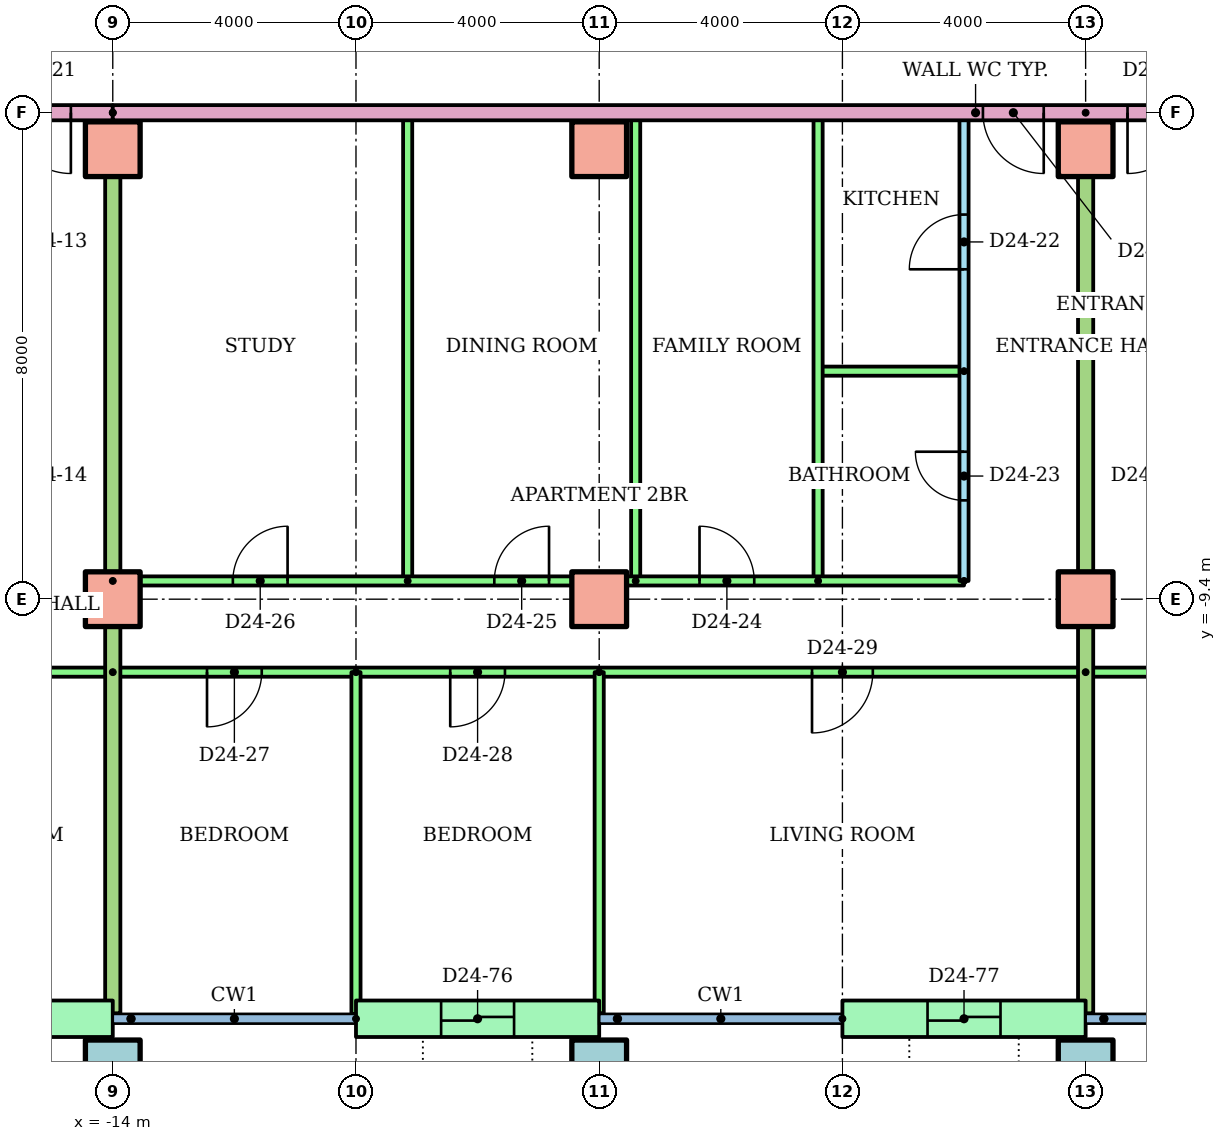
"""IFC4 building model, lengths in metres.
Left out: names, types, materials, properties, quantities, classifications, styles, units other than length and angle.
Written with IfcOpenShell. Run it as: python <this file> out.ifc"""

import sys

from ifc_helpers import new_model, si_unit, direction, frame, frame_2d, origin, origin_2d, place, context, subcontext, project, spatial, rectangle, hollow_rectangle, extrude, element, fill, save


model = new_model("IFC4")
c1 = context("Model", 3, precision=1e-05, world=origin(), true_north=direction((0.0, 1.0)))
c2 = subcontext(c1, "Body", "Model", "MODEL_VIEW")
j1 = project(units=[si_unit("LENGTHUNIT", "METRE"), si_unit("PLANEANGLEUNIT", "RADIAN")], contexts=[c1])
p1 = place(None, origin())
s1 = spatial("IfcSite", under=j1, at=p1, CompositionType="ELEMENT")
p2 = place(p1, origin())
s2 = spatial("IfcBuilding", under=s1, at=p2, CompositionType="ELEMENT")
p3 = place(p2, frame((0.0, 0.0, 93.5)))
s3 = spatial("IfcBuildingStorey", under=s2, at=p3, CompositionType="ELEMENT", Elevation=93.5)
for number, where in (
    (1, (-14.0, -17.1, 0.0)),
    (2, (-6.0, -17.1, 0.0)),
    (3, (2.0, -17.1, 0.0)),
):
    element("IfcColumn", number, at=place(p3, frame(where)), inside=s3, PredefinedType="COLUMN", context=c2, shape_type="SweptSolid", body=[
        extrude(hollow_rectangle(XDim=0.9, YDim=0.9, WallThickness=0.045, at=origin_2d()), origin(), (0.0, 0.0, 1.0), 3.2),
    ])
for number, where in (
    (4, (-14.0, -9.4, 0.0)),
    (5, (-6.0, -9.4, 0.0)),
    (6, (2.0, -9.4, 0.0)),
    (7, (-14.0, -2.0, 0.0)),
    (8, (-6.0, -2.0, 0.0)),
    (9, (2.0, -2.0, 0.0)),
):
    element("IfcColumn", number, at=place(p3, frame(where)), inside=s3, PredefinedType="COLUMN", context=c2, shape_type="SweptSolid", body=[
        extrude(rectangle(XDim=0.9, YDim=0.9, at=origin_2d()), origin(), (0.0, 0.0, 1.0), 3.2),
    ])
p4 = place(p3, frame((-18.0, -16.3, 0.0)))
e10 = element("IfcWall", 10, at=p4, inside=s3, PredefinedType="STANDARD", context=c2, shape_type="SweptSolid", body=[
    extrude(rectangle(XDim=4.0, YDim=0.6, at=frame_2d((2.0, 0.0))), origin(), (0.0, 0.0, 1.0), 2.92),
])
p5 = place(p4, frame((1.4, 0.0, 0.0)))
e11 = element("IfcOpeningElement", 11, at=p5, cuts=e10, PredefinedType="OPENING", context=c2, shape_type="SweptSolid", body=[
    extrude(rectangle(XDim=1.2, YDim=2.1, at=frame_2d((0.6, 1.05))), frame((0.0, 0.31, 0.0), z_axis=(0.0, -1.0, 0.0), x_axis=(1.0, 0.0, 0.0)), (0.0, 0.0, 1.0), 0.62),
])
p6 = place(p3, frame((-10.0, -16.3, 0.0)))
e12 = element("IfcWall", 12, at=p6, inside=s3, PredefinedType="STANDARD", context=c2, shape_type="SweptSolid", body=[
    extrude(rectangle(XDim=4.0, YDim=0.6, at=frame_2d((2.0, 0.0))), origin(), (0.0, 0.0, 1.0), 2.92),
])
p7 = place(p6, frame((1.4, 0.0, 0.0)))
e13 = element("IfcOpeningElement", 13, at=p7, cuts=e12, PredefinedType="OPENING", context=c2, shape_type="SweptSolid", body=[
    extrude(rectangle(XDim=1.2, YDim=2.1, at=frame_2d((0.6, 1.05))), frame((0.0, 0.31, 0.0), z_axis=(0.0, -1.0, 0.0), x_axis=(1.0, 0.0, 0.0)), (0.0, 0.0, 1.0), 0.62),
])
p8 = place(p3, frame((-2.0, -16.3, 0.0)))
e14 = element("IfcWall", 14, at=p8, inside=s3, PredefinedType="STANDARD", context=c2, shape_type="SweptSolid", body=[
    extrude(rectangle(XDim=4.0, YDim=0.6, at=frame_2d((2.0, 0.0))), origin(), (0.0, 0.0, 1.0), 2.92),
])
p9 = place(p8, frame((1.4, 0.0, 0.0)))
e15 = element("IfcOpeningElement", 15, at=p9, cuts=e14, PredefinedType="OPENING", context=c2, shape_type="SweptSolid", body=[
    extrude(rectangle(XDim=1.2, YDim=2.1, at=frame_2d((0.6, 1.05))), frame((0.0, 0.31, 0.0), z_axis=(0.0, -1.0, 0.0), x_axis=(1.0, 0.0, 0.0)), (0.0, 0.0, 1.0), 0.62),
])
p10 = place(p3, frame((-14.0, -10.6, 0.0), z_axis=(0.0, 0.0, 1.0), x_axis=(-1.0, 0.0, 0.0)))
e16 = element("IfcWall", 16, at=p10, inside=s3, PredefinedType="PARTITIONING", context=c2, shape_type="SweptSolid", body=[
    extrude(rectangle(XDim=14.62, YDim=0.15, at=frame_2d((7.31, 0.0))), origin(), (0.0, 0.0, 1.0), 2.4),
])
p11 = place(p10, frame((11.7, 0.0, 0.0)))
e17 = element("IfcOpeningElement", 17, at=p11, cuts=e16, PredefinedType="OPENING", context=c2, shape_type="SweptSolid", body=[
    extrude(rectangle(XDim=0.9, YDim=2.1, at=frame_2d((0.45, 1.05))), frame((0.0, 0.085, 0.0), z_axis=(0.0, -1.0, 0.0), x_axis=(1.0, 0.0, 0.0)), (0.0, 0.0, 1.0), 0.17),
])
p12 = place(p10, frame((6.261, 0.0, 0.0)))
e18 = element("IfcOpeningElement", 18, at=p12, cuts=e16, PredefinedType="OPENING", context=c2, shape_type="SweptSolid", body=[
    extrude(rectangle(XDim=0.9, YDim=2.1, at=frame_2d((0.45, 1.05))), frame((0.0, 0.085, 0.0), z_axis=(0.0, -1.0, 0.0), x_axis=(1.0, 0.0, 0.0)), (0.0, 0.0, 1.0), 0.17),
])
p13 = place(p10, frame((1.5, 0.0, 0.0)))
e19 = element("IfcOpeningElement", 19, at=p13, cuts=e16, PredefinedType="OPENING", context=c2, shape_type="SweptSolid", body=[
    extrude(rectangle(XDim=1.0, YDim=2.1, at=frame_2d((0.5, 1.05))), frame((0.0, 0.085, 0.0), z_axis=(0.0, -1.0, 0.0), x_axis=(1.0, 0.0, 0.0)), (0.0, 0.0, 1.0), 0.17),
])
p14 = place(p3, frame((0.0, -9.1, 0.0), z_axis=(0.0, 0.0, 1.0), x_axis=(0.0, 1.0, 0.0)))
e20 = element("IfcWall", 20, at=p14, inside=s3, PredefinedType="PARTITIONING", context=c2, shape_type="SweptSolid", body=[
    extrude(rectangle(XDim=7.7, YDim=0.15, at=frame_2d((3.85, 0.0))), origin(), (0.0, 0.0, 1.0), 2.4),
])
p15 = place(p14, frame((5.125, 0.0, 0.0)))
e21 = element("IfcOpeningElement", 21, at=p15, cuts=e20, PredefinedType="OPENING", context=c2, shape_type="SweptSolid", body=[
    extrude(rectangle(XDim=0.9, YDim=2.1, at=frame_2d((0.45, 1.05))), frame((0.0, 0.085, 0.0), z_axis=(0.0, -1.0, 0.0), x_axis=(1.0, 0.0, 0.0)), (0.0, 0.0, 1.0), 0.17),
])
p16 = place(p14, frame((1.325, 0.0, 0.0)))
e22 = element("IfcOpeningElement", 22, at=p16, cuts=e20, PredefinedType="OPENING", context=c2, shape_type="SweptSolid", body=[
    extrude(rectangle(XDim=0.8, YDim=2.1, at=frame_2d((0.4, 1.05))), frame((0.0, 0.085, 0.0), z_axis=(0.0, -1.0, 0.0), x_axis=(1.0, 0.0, 0.0)), (0.0, 0.0, 1.0), 0.17),
])
p17 = place(p3, frame((0.0, -5.65, 0.0), z_axis=(0.0, 0.0, 1.0), x_axis=(-1.0, 0.0, 0.0)))
e23 = element("IfcWall", 23, at=p17, inside=s3, PredefinedType="PARTITIONING", context=c2, shape_type="SweptSolid", body=[
    extrude(rectangle(XDim=2.4, YDim=0.15, at=frame_2d((1.2, 0.0))), origin(), (0.0, 0.0, 1.0), 2.4),
])
for number, where, z_axis, x_axis in (
    (24, (-2.4, -9.1, 0.0), (0.0, 0.0, 1.0), (0.0, 1.0, 0.0)),
    (25, (-5.4, -9.1, 0.0), (0.0, 0.0, 1.0), (0.0, 1.0, 0.0)),
    (26, (-9.15, -9.1, 0.0), (0.0, 0.0, 1.0), (0.0, 1.0, 0.0)),
):
    element("IfcWall", number, at=place(p3, frame(where, z_axis=z_axis, x_axis=x_axis)), inside=s3, PredefinedType="PARTITIONING", context=c2, shape_type="SweptSolid", body=[
        extrude(rectangle(XDim=7.7, YDim=0.15, at=frame_2d((3.85, 0.0))), origin(), (0.0, 0.0, 1.0), 2.4),
    ])
p18 = place(p3, frame((-14.0, -9.1, 0.0)))
e27 = element("IfcWall", 27, at=p18, inside=s3, PredefinedType="PARTITIONING", context=c2, shape_type="SweptSolid", body=[
    extrude(rectangle(XDim=14.0, YDim=0.15, at=frame_2d((7.0, 0.0))), origin(), (0.0, 0.0, 1.0), 2.4),
])
p19 = place(p18, frame((9.65, 0.0, 0.0)))
e28 = element("IfcOpeningElement", 28, at=p19, cuts=e27, PredefinedType="OPENING", context=c2, shape_type="SweptSolid", body=[
    extrude(rectangle(XDim=0.9, YDim=2.1, at=frame_2d((0.45, 1.05))), frame((0.0, 0.085, 0.0), z_axis=(0.0, -1.0, 0.0), x_axis=(1.0, 0.0, 0.0)), (0.0, 0.0, 1.0), 0.17),
])
p20 = place(p18, frame((6.275, 0.0, 0.0)))
e29 = element("IfcOpeningElement", 29, at=p20, cuts=e27, PredefinedType="OPENING", context=c2, shape_type="SweptSolid", body=[
    extrude(rectangle(XDim=0.9, YDim=2.1, at=frame_2d((0.45, 1.05))), frame((0.0, 0.085, 0.0), z_axis=(0.0, -1.0, 0.0), x_axis=(1.0, 0.0, 0.0)), (0.0, 0.0, 1.0), 0.17),
])
p21 = place(p18, frame((1.975, 0.0, 0.0)))
e30 = element("IfcOpeningElement", 30, at=p21, cuts=e27, PredefinedType="OPENING", context=c2, shape_type="SweptSolid", body=[
    extrude(rectangle(XDim=0.9, YDim=2.1, at=frame_2d((0.45, 1.05))), frame((0.0, 0.085, 0.0), z_axis=(0.0, -1.0, 0.0), x_axis=(1.0, 0.0, 0.0)), (0.0, 0.0, 1.0), 0.17),
])
p22 = place(p3, frame((2.0, -10.6, 0.0), z_axis=(0.0, 0.0, 1.0), x_axis=(-1.0, 0.0, 0.0)))
e31 = element("IfcWall", 31, at=p22, inside=s3, PredefinedType="PARTITIONING", context=c2, shape_type="SweptSolid", body=[
    extrude(rectangle(XDim=16.0, YDim=0.15, at=frame_2d((8.0, 0.0))), origin(), (0.0, 0.0, 1.0), 2.4),
])
p23 = place(p22, frame((13.55, 0.0, 0.0)))
e32 = element("IfcOpeningElement", 32, at=p23, cuts=e31, PredefinedType="OPENING", context=c2, shape_type="SweptSolid", body=[
    extrude(rectangle(XDim=0.9, YDim=2.1, at=frame_2d((0.45, 1.05))), frame((0.0, 0.085, 0.0), z_axis=(0.0, -1.0, 0.0), x_axis=(1.0, 0.0, 0.0)), (0.0, 0.0, 1.0), 0.17),
])
p24 = place(p22, frame((9.55, 0.0, 0.0)))
e33 = element("IfcOpeningElement", 33, at=p24, cuts=e31, PredefinedType="OPENING", context=c2, shape_type="SweptSolid", body=[
    extrude(rectangle(XDim=0.9, YDim=2.1, at=frame_2d((0.45, 1.05))), frame((0.0, 0.085, 0.0), z_axis=(0.0, -1.0, 0.0), x_axis=(1.0, 0.0, 0.0)), (0.0, 0.0, 1.0), 0.17),
])
p25 = place(p22, frame((3.5, 0.0, 0.0)))
e34 = element("IfcOpeningElement", 34, at=p25, cuts=e31, PredefinedType="OPENING", context=c2, shape_type="SweptSolid", body=[
    extrude(rectangle(XDim=1.0, YDim=2.1, at=frame_2d((0.5, 1.05))), frame((0.0, 0.085, 0.0), z_axis=(0.0, -1.0, 0.0), x_axis=(1.0, 0.0, 0.0)), (0.0, 0.0, 1.0), 0.17),
])
p26 = place(p3, frame((-10.0, -10.6, 0.0), z_axis=(0.0, 0.0, 1.0), x_axis=(0.0, -1.0, 0.0)))
e35 = element("IfcWall", 35, at=p26, inside=s3, PredefinedType="PARTITIONING", context=c2, shape_type="SweptSolid", body=[
    extrude(rectangle(XDim=5.621, YDim=0.15, at=frame_2d((2.811, 0.0))), origin(), (0.0, 0.0, 1.0), 2.4),
])
p27 = place(p3, frame((-6.0, -10.6, 0.0), z_axis=(0.0, 0.0, 1.0), x_axis=(0.0, -1.0, 0.0)))
e36 = element("IfcWall", 36, at=p27, inside=s3, PredefinedType="PARTITIONING", context=c2, shape_type="SweptSolid", body=[
    extrude(rectangle(XDim=5.61, YDim=0.15, at=frame_2d((2.805, 0.0))), origin(), (0.0, 0.0, 1.0), 2.4),
])
p28 = place(p3, frame((-14.0, -1.4, 0.0), z_axis=(0.0, 0.0, 1.0), x_axis=(0.0, -1.0, 0.0)))
e37 = element("IfcWall", 37, at=p28, inside=s3, PredefinedType="PARTITIONING", context=c2, shape_type="SweptSolid", body=[
    extrude(rectangle(XDim=14.81, YDim=0.25, at=frame_2d((7.405, 0.0))), origin(), (0.0, 0.0, 1.0), 2.4),
])
p29 = place(p3, frame((18.0, -10.6, 0.0), z_axis=(0.0, 0.0, 1.0), x_axis=(-1.0, 0.0, 0.0)))
e38 = element("IfcWall", 38, at=p29, inside=s3, PredefinedType="PARTITIONING", context=c2, shape_type="SweptSolid", body=[
    extrude(rectangle(XDim=16.0, YDim=0.15, at=frame_2d((8.0, 0.0))), origin(), (0.0, 0.0, 1.0), 2.4),
])
p30 = place(p29, frame((11.5, 0.0, 0.0)))
e39 = element("IfcOpeningElement", 39, at=p30, cuts=e38, PredefinedType="OPENING", context=c2, shape_type="SweptSolid", body=[
    extrude(rectangle(XDim=1.0, YDim=2.1, at=frame_2d((0.5, 1.05))), frame((0.0, 0.085, 0.0), z_axis=(0.0, -1.0, 0.0), x_axis=(1.0, 0.0, 0.0)), (0.0, 0.0, 1.0), 0.17),
])
p31 = place(p29, frame((5.55, 0.0, 0.0)))
e40 = element("IfcOpeningElement", 40, at=p31, cuts=e38, PredefinedType="OPENING", context=c2, shape_type="SweptSolid", body=[
    extrude(rectangle(XDim=0.9, YDim=2.1, at=frame_2d((0.45, 1.05))), frame((0.0, 0.085, 0.0), z_axis=(0.0, -1.0, 0.0), x_axis=(1.0, 0.0, 0.0)), (0.0, 0.0, 1.0), 0.17),
])
p32 = place(p29, frame((1.55, 0.0, 0.0)))
e41 = element("IfcOpeningElement", 41, at=p32, cuts=e38, PredefinedType="OPENING", context=c2, shape_type="SweptSolid", body=[
    extrude(rectangle(XDim=0.9, YDim=2.1, at=frame_2d((0.45, 1.05))), frame((0.0, 0.085, 0.0), z_axis=(0.0, -1.0, 0.0), x_axis=(1.0, 0.0, 0.0)), (0.0, 0.0, 1.0), 0.17),
])
p33 = place(p3, frame((2.0, -1.4, 0.0), z_axis=(0.0, 0.0, 1.0), x_axis=(0.0, -1.0, 0.0)))
e42 = element("IfcWall", 42, at=p33, inside=s3, PredefinedType="PARTITIONING", context=c2, shape_type="SweptSolid", body=[
    extrude(rectangle(XDim=14.81, YDim=0.25, at=frame_2d((7.405, 0.0))), origin(), (0.0, 0.0, 1.0), 2.4),
])
p34 = place(p3, frame((-14.0, -1.4, 0.0), z_axis=(0.0, 0.0, 1.0), x_axis=(-1.0, 0.0, 0.0)))
e43 = element("IfcWall", 43, at=p34, inside=s3, PredefinedType="PARTITIONING", context=c2, shape_type="SweptSolid", body=[
    extrude(rectangle(XDim=14.62, YDim=0.25, at=frame_2d((7.31, 0.0))), origin(), (0.0, 0.0, 1.0), 2.4),
])
p35 = place(p34, frame((0.689, 0.0, 0.0)))
e44 = element("IfcOpeningElement", 44, at=p35, cuts=e43, PredefinedType="OPENING", context=c2, shape_type="SweptSolid", body=[
    extrude(rectangle(XDim=1.0, YDim=2.1, at=frame_2d((0.5, 1.05))), frame((0.0, 0.135, 0.0), z_axis=(0.0, -1.0, 0.0), x_axis=(1.0, 0.0, 0.0)), (0.0, 0.0, 1.0), 0.27),
])
p36 = place(p3, frame((14.0, -1.4, 0.0), z_axis=(0.0, 0.0, 1.0), x_axis=(-1.0, 0.0, 0.0)))
e45 = element("IfcWall", 45, at=p36, inside=s3, PredefinedType="PARTITIONING", context=c2, shape_type="SweptSolid", body=[
    extrude(rectangle(XDim=28.0, YDim=0.25, at=frame_2d((14.0, 0.0))), origin(), (0.0, 0.0, 1.0), 2.4),
])
p37 = place(p36, frame((12.689, 0.0, 0.0)))
e46 = element("IfcOpeningElement", 46, at=p37, cuts=e45, PredefinedType="OPENING", context=c2, shape_type="SweptSolid", body=[
    extrude(rectangle(XDim=1.0, YDim=2.1, at=frame_2d((0.5, 1.05))), frame((0.0, 0.135, 0.0), z_axis=(0.0, -1.0, 0.0), x_axis=(1.0, 0.0, 0.0)), (0.0, 0.0, 1.0), 0.27),
])
p38 = place(p36, frame((10.311, 0.0, 0.0)))
e47 = element("IfcOpeningElement", 47, at=p38, cuts=e45, PredefinedType="OPENING", context=c2, shape_type="SweptSolid", body=[
    extrude(rectangle(XDim=1.0, YDim=2.1, at=frame_2d((0.5, 1.05))), frame((0.0, 0.135, 0.0), z_axis=(0.0, -1.0, 0.0), x_axis=(1.0, 0.0, 0.0)), (0.0, 0.0, 1.0), 0.27),
])
p39 = place(p35, origin())
e48 = element("IfcDoor", 48, at=p39, inside=s3, OperationType="SINGLE_SWING_LEFT", PredefinedType="DOOR", context=c2, shape_type="SweptSolid", body=[
    extrude(rectangle(XDim=1.0, YDim=2.1, at=frame_2d((0.5, 1.05))), frame((0.0, 0.025, 0.0), z_axis=(0.0, -1.0, 0.0), x_axis=(1.0, 0.0, 0.0)), (0.0, 0.0, 1.0), 0.05),
])
fill(e44, e48)
p40 = place(p15, origin())
e49 = element("IfcDoor", 49, at=p40, inside=s3, OperationType="SINGLE_SWING_LEFT", PredefinedType="DOOR", context=c2, shape_type="SweptSolid", body=[
    extrude(rectangle(XDim=0.9, YDim=2.1, at=frame_2d((0.45, 1.05))), frame((0.0, 0.025, 0.0), z_axis=(0.0, -1.0, 0.0), x_axis=(1.0, 0.0, 0.0)), (0.0, 0.0, 1.0), 0.05),
])
fill(e21, e49)
p41 = place(p16, origin())
e50 = element("IfcDoor", 50, at=p41, inside=s3, OperationType="SINGLE_SWING_RIGHT", PredefinedType="DOOR", context=c2, shape_type="SweptSolid", body=[
    extrude(rectangle(XDim=0.8, YDim=2.1, at=frame_2d((0.4, 1.05))), frame((0.0, 0.025, 0.0), z_axis=(0.0, -1.0, 0.0), x_axis=(1.0, 0.0, 0.0)), (0.0, 0.0, 1.0), 0.05),
])
fill(e22, e50)
p42 = place(p19, origin())
e51 = element("IfcDoor", 51, at=p42, inside=s3, OperationType="SINGLE_SWING_LEFT", PredefinedType="DOOR", context=c2, shape_type="SweptSolid", body=[
    extrude(rectangle(XDim=0.9, YDim=2.1, at=frame_2d((0.45, 1.05))), frame((0.0, 0.025, 0.0), z_axis=(0.0, -1.0, 0.0), x_axis=(1.0, 0.0, 0.0)), (0.0, 0.0, 1.0), 0.05),
])
fill(e28, e51)
p43 = place(p20, origin())
e52 = element("IfcDoor", 52, at=p43, inside=s3, OperationType="SINGLE_SWING_RIGHT", PredefinedType="DOOR", context=c2, shape_type="SweptSolid", body=[
    extrude(rectangle(XDim=0.9, YDim=2.1, at=frame_2d((0.45, 1.05))), frame((0.0, 0.025, 0.0), z_axis=(0.0, -1.0, 0.0), x_axis=(1.0, 0.0, 0.0)), (0.0, 0.0, 1.0), 0.05),
])
fill(e29, e52)
p44 = place(p21, origin())
e53 = element("IfcDoor", 53, at=p44, inside=s3, OperationType="SINGLE_SWING_RIGHT", PredefinedType="DOOR", context=c2, shape_type="SweptSolid", body=[
    extrude(rectangle(XDim=0.9, YDim=2.1, at=frame_2d((0.45, 1.05))), frame((0.0, 0.025, 0.0), z_axis=(0.0, -1.0, 0.0), x_axis=(1.0, 0.0, 0.0)), (0.0, 0.0, 1.0), 0.05),
])
fill(e30, e53)
p45 = place(p23, origin())
e54 = element("IfcDoor", 54, at=p45, inside=s3, OperationType="SINGLE_SWING_RIGHT", PredefinedType="DOOR", context=c2, shape_type="SweptSolid", body=[
    extrude(rectangle(XDim=0.9, YDim=2.1, at=frame_2d((0.45, 1.05))), frame((0.0, 0.025, 0.0), z_axis=(0.0, -1.0, 0.0), x_axis=(1.0, 0.0, 0.0)), (0.0, 0.0, 1.0), 0.05),
])
fill(e32, e54)
p46 = place(p24, origin())
e55 = element("IfcDoor", 55, at=p46, inside=s3, OperationType="SINGLE_SWING_RIGHT", PredefinedType="DOOR", context=c2, shape_type="SweptSolid", body=[
    extrude(rectangle(XDim=0.9, YDim=2.1, at=frame_2d((0.45, 1.05))), frame((0.0, 0.025, 0.0), z_axis=(0.0, -1.0, 0.0), x_axis=(1.0, 0.0, 0.0)), (0.0, 0.0, 1.0), 0.05),
])
fill(e33, e55)
p47 = place(p25, origin())
e56 = element("IfcDoor", 56, at=p47, inside=s3, OperationType="SINGLE_SWING_RIGHT", PredefinedType="DOOR", context=c2, shape_type="SweptSolid", body=[
    extrude(rectangle(XDim=1.0, YDim=2.1, at=frame_2d((0.5, 1.05))), frame((0.0, 0.025, 0.0), z_axis=(0.0, -1.0, 0.0), x_axis=(1.0, 0.0, 0.0)), (0.0, 0.0, 1.0), 0.05),
])
fill(e34, e56)
p48 = place(p37, origin())
e57 = element("IfcDoor", 57, at=p48, inside=s3, OperationType="SINGLE_SWING_LEFT", PredefinedType="DOOR", context=c2, shape_type="SweptSolid", body=[
    extrude(rectangle(XDim=1.0, YDim=2.1, at=frame_2d((0.5, 1.05))), frame((0.0, 0.025, 0.0), z_axis=(0.0, -1.0, 0.0), x_axis=(1.0, 0.0, 0.0)), (0.0, 0.0, 1.0), 0.05),
])
fill(e46, e57)
p49 = place(p38, origin())
e58 = element("IfcDoor", 58, at=p49, inside=s3, OperationType="SINGLE_SWING_RIGHT", PredefinedType="DOOR", context=c2, shape_type="SweptSolid", body=[
    extrude(rectangle(XDim=1.0, YDim=2.1, at=frame_2d((0.5, 1.05))), frame((0.0, 0.025, 0.0), z_axis=(0.0, -1.0, 0.0), x_axis=(1.0, 0.0, 0.0)), (0.0, 0.0, 1.0), 0.05),
])
fill(e47, e58)
p50 = place(p7, origin())
e59 = element("IfcDoor", 59, at=p50, inside=s3, OperationType="SLIDING_TO_LEFT", PredefinedType="DOOR", context=c2, shape_type="SweptSolid", body=[
    extrude(rectangle(XDim=1.2, YDim=2.1, at=frame_2d((0.6, 1.05))), frame((0.0, 0.025, 0.0), z_axis=(0.0, -1.0, 0.0), x_axis=(1.0, 0.0, 0.0)), (0.0, 0.0, 1.0), 0.05),
])
fill(e13, e59)
p51 = place(p9, origin())
e60 = element("IfcDoor", 60, at=p51, inside=s3, OperationType="SLIDING_TO_LEFT", PredefinedType="DOOR", context=c2, shape_type="SweptSolid", body=[
    extrude(rectangle(XDim=1.2, YDim=2.1, at=frame_2d((0.6, 1.05))), frame((0.0, 0.025, 0.0), z_axis=(0.0, -1.0, 0.0), x_axis=(1.0, 0.0, 0.0)), (0.0, 0.0, 1.0), 0.05),
])
fill(e15, e60)
save(model, sys.argv[1])
